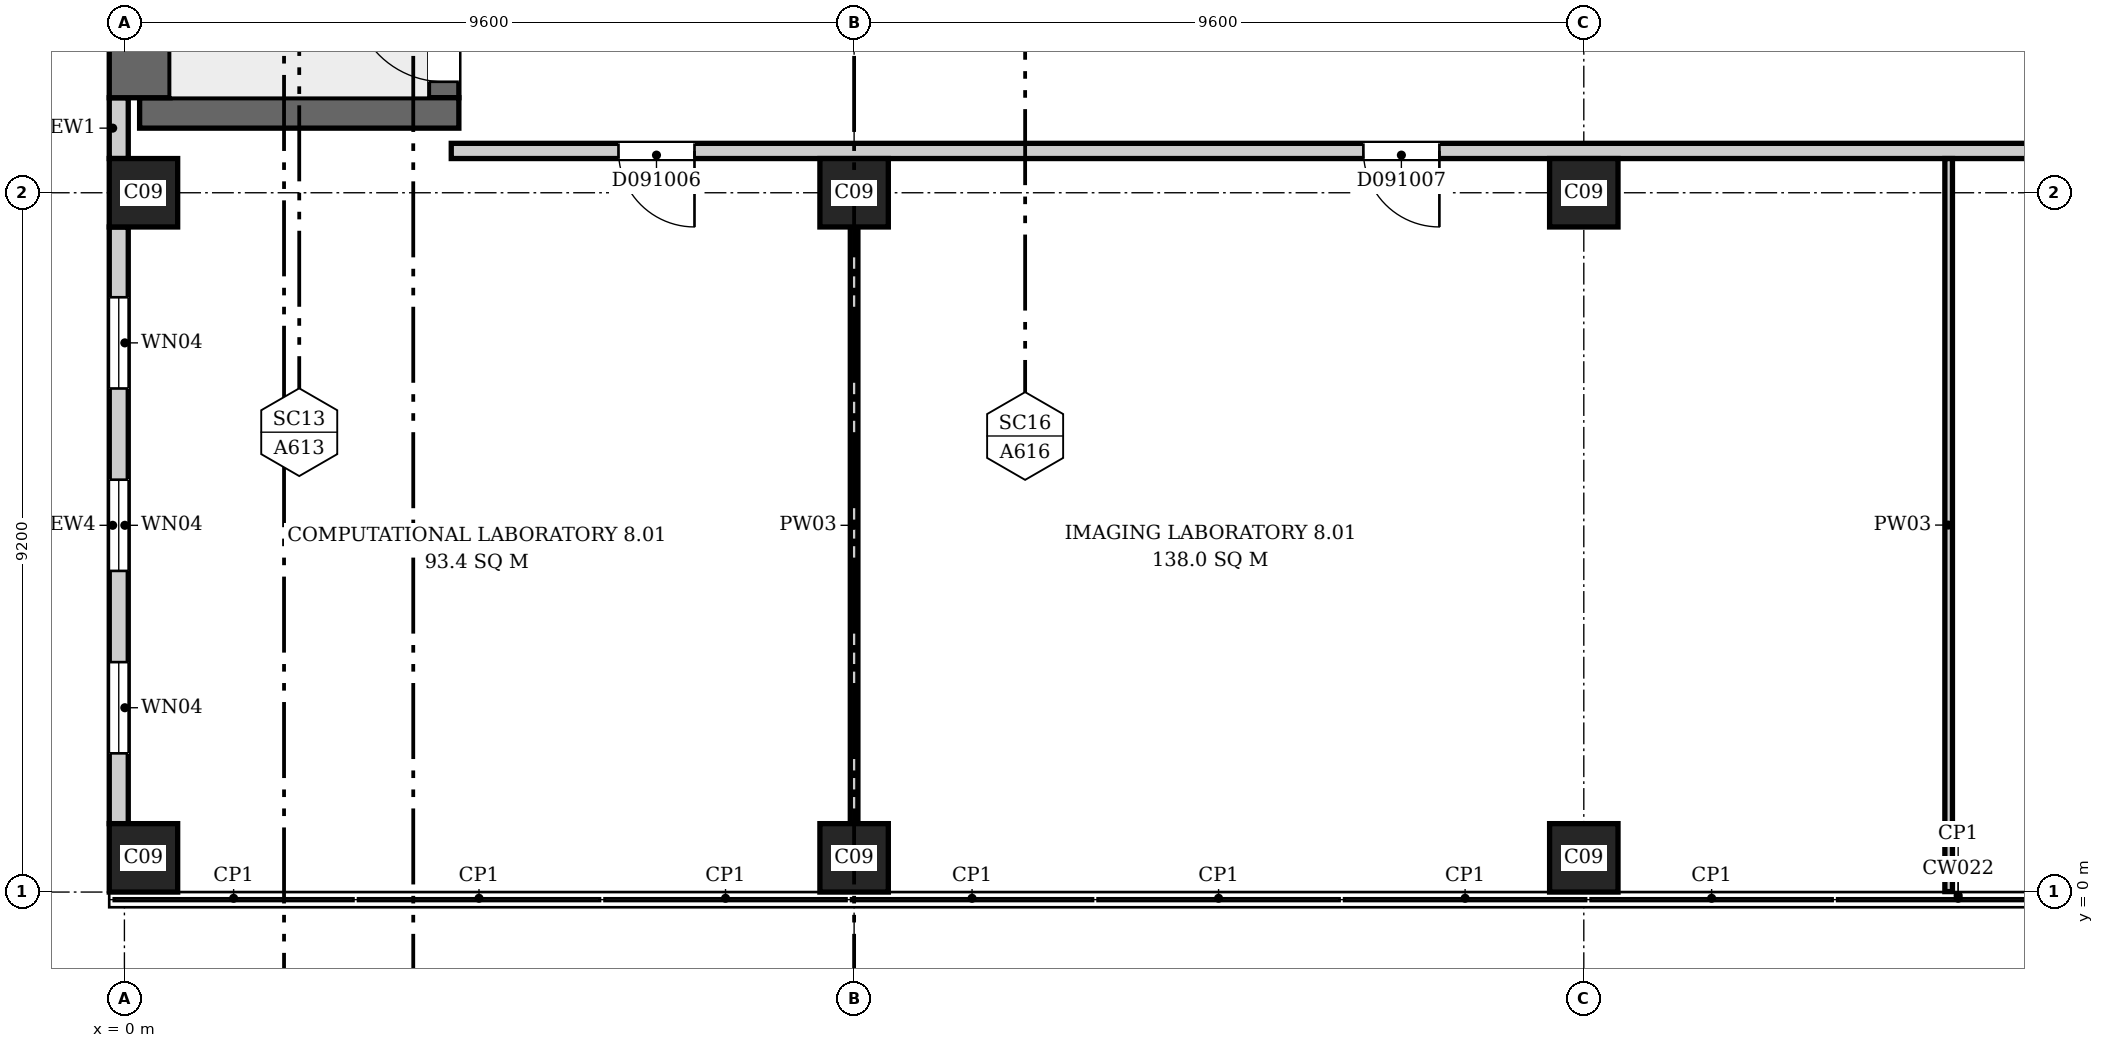
"""IFC4 building model, lengths in metres.
Left out: names, types, materials, properties, quantities, classifications, styles, units other than length and angle.
Written with IfcOpenShell. Run it as: python <this file> out.ifc"""

import sys

from ifc_helpers import new_model, si_unit, direction, frame, frame_2d, origin, origin_2d, place, context, subcontext, project, spatial, rectangle, extrude, element, fill, save


model = new_model("IFC4")
c1 = context("Model", 3, precision=1e-05, world=origin(), true_north=direction((0.0, 1.0)))
c2 = subcontext(c1, "Body", "Model", "MODEL_VIEW")
j1 = project(units=[si_unit("LENGTHUNIT", "METRE"), si_unit("PLANEANGLEUNIT", "RADIAN")], contexts=[c1])
p1 = place(None, origin())
s1 = spatial("IfcSite", under=j1, at=p1, CompositionType="ELEMENT")
p2 = place(p1, origin())
s2 = spatial("IfcBuilding", under=s1, at=p2, CompositionType="ELEMENT")
p3 = place(p2, frame((0.0, 0.0, 44.5)))
s3 = spatial("IfcBuildingStorey", under=s2, at=p3, CompositionType="ELEMENT", Elevation=44.5)
p4 = place(p3, frame((0.2, 10.25, 0.0), z_axis=(0.0, 0.0, 1.0), x_axis=(1.0, 0.0, 0.0)))
e1 = element("IfcWall", 1, at=p4, inside=s3, PredefinedType="SHEAR", context=c2, shape_type="SweptSolid", body=[
    extrude(rectangle(XDim=4.2, YDim=0.4, at=frame_2d((2.1, 0.0))), origin(), (0.0, 0.0, 1.0), 4.2),
])
p5 = place(p3, frame((0.2, 10.45, 0.0), z_axis=(0.0, 0.0, 1.0), x_axis=(0.0, 1.0, 0.0)))
e2 = element("IfcWall", 2, at=p5, inside=s3, PredefinedType="SHEAR", context=c2, shape_type="SweptSolid", body=[
    extrude(rectangle(XDim=6.6, YDim=0.8, at=frame_2d((3.3, 0.0))), origin(), (0.0, 0.0, 1.0), 4.2),
])
p6 = place(p3, frame((4.2, 10.45, 0.0), z_axis=(0.0, 0.0, 1.0), x_axis=(0.0, 1.0, 0.0)))
e3 = element("IfcWall", 3, at=p6, inside=s3, PredefinedType="SHEAR", context=c2, shape_type="SweptSolid", body=[
    extrude(rectangle(XDim=6.6, YDim=0.4, at=frame_2d((3.3, 0.0))), origin(), (0.0, 0.0, 1.0), 4.2),
])
p7 = place(p6, frame((0.21, 0.0, 0.0)))
e4 = element("IfcOpeningElement", 4, at=p7, cuts=e3, PredefinedType="OPENING", context=c2, shape_type="SweptSolid", body=[
    extrude(rectangle(XDim=1.2, YDim=2.1, at=frame_2d((0.6, 1.05))), frame((0.0, 0.21, 0.0), z_axis=(0.0, -1.0, 0.0), x_axis=(1.0, 0.0, 0.0)), (0.0, 0.0, 1.0), 0.42),
])
for number, where, z_axis, x_axis in (
    (5, (0.25, 0.45, 0.0), (0.0, 0.0, 1.0), (1.0, 0.0, 0.0)),
    (6, (9.6, 0.45, 0.0), (0.0, 0.0, 1.0), (1.0, 0.0, 0.0)),
    (7, (19.2, 0.45, 0.0), (0.0, 0.0, 1.0), (1.0, 0.0, 0.0)),
    (8, (0.25, 9.2, 0.0), (0.0, 0.0, 1.0), (1.0, 0.0, 0.0)),
    (9, (9.6, 9.2, 0.0), (0.0, 0.0, 1.0), (1.0, 0.0, 0.0)),
    (10, (19.2, 9.2, 0.0), (0.0, 0.0, 1.0), (1.0, 0.0, 0.0)),
):
    element("IfcColumn", number, at=place(p3, frame(where, z_axis=z_axis, x_axis=x_axis)), inside=s3, PredefinedType="COLUMN", context=c2, shape_type="SweptSolid", body=[
        extrude(rectangle(XDim=0.9, YDim=0.9, at=origin_2d()), origin(), (0.0, 0.0, 1.0), 4.2),
    ])
p8 = place(p3, frame((-0.074, 8.75, 0.0), z_axis=(0.0, 0.0, 1.0), x_axis=(0.0, -1.0, 0.0)))
e11 = element("IfcWall", 11, at=p8, inside=s3, PredefinedType="ELEMENTEDWALL", context=c2, shape_type="SweptSolid", body=[
    extrude(rectangle(XDim=7.85, YDim=0.25, at=frame_2d((3.925, 0.0))), origin(), (0.0, 0.0, 1.0), 3.9),
])
p9 = place(p8, frame((5.725, 0.0, 0.9)))
e12 = element("IfcOpeningElement", 12, at=p9, cuts=e11, PredefinedType="OPENING", context=c2, shape_type="SweptSolid", body=[
    extrude(rectangle(XDim=1.2, YDim=2.6, at=frame_2d((0.6, 1.3))), frame((0.0, 0.135, 0.0), z_axis=(0.0, -1.0, 0.0), x_axis=(1.0, 0.0, 0.0)), (0.0, 0.0, 1.0), 0.27),
])
p10 = place(p8, frame((3.325, 0.0, 0.9)))
e13 = element("IfcOpeningElement", 13, at=p10, cuts=e11, PredefinedType="OPENING", context=c2, shape_type="SweptSolid", body=[
    extrude(rectangle(XDim=1.2, YDim=2.6, at=frame_2d((0.6, 1.3))), frame((0.0, 0.135, 0.0), z_axis=(0.0, -1.0, 0.0), x_axis=(1.0, 0.0, 0.0)), (0.0, 0.0, 1.0), 0.27),
])
p11 = place(p8, frame((0.925, 0.0, 0.9)))
e14 = element("IfcOpeningElement", 14, at=p11, cuts=e11, PredefinedType="OPENING", context=c2, shape_type="SweptSolid", body=[
    extrude(rectangle(XDim=1.2, YDim=2.6, at=frame_2d((0.6, 1.3))), frame((0.0, 0.135, 0.0), z_axis=(0.0, -1.0, 0.0), x_axis=(1.0, 0.0, 0.0)), (0.0, 0.0, 1.0), 0.27),
])
p12 = place(p3, frame((-0.074, 10.45, 0.0), z_axis=(0.0, 0.0, 1.0), x_axis=(0.0, -1.0, 0.0)))
e15 = element("IfcWall", 15, at=p12, inside=s3, PredefinedType="ELEMENTEDWALL", context=c2, shape_type="SweptSolid", body=[
    extrude(rectangle(XDim=0.8, YDim=0.25, at=frame_2d((0.4, 0.0))), origin(), (0.0, 0.0, 1.0), 3.9),
])
p13 = place(p3, frame((4.3, 9.75, 0.0), z_axis=(0.0, 0.0, 1.0), x_axis=(1.0, 0.0, 0.0)))
e16 = element("IfcWall", 16, at=p13, inside=s3, PredefinedType="PARTITIONING", context=c2, shape_type="SweptSolid", body=[
    extrude(rectangle(XDim=43.894, YDim=0.2, at=frame_2d((21.947, 0.0))), origin(), (0.0, 0.0, 1.0), 3.9),
])
p14 = place(p13, frame((2.2, 0.0, 0.0)))
e17 = element("IfcOpeningElement", 17, at=p14, cuts=e16, PredefinedType="OPENING", context=c2, shape_type="SweptSolid", body=[
    extrude(rectangle(XDim=1.0, YDim=2.1, at=frame_2d((0.5, 1.05))), frame((0.0, 0.11, 0.0), z_axis=(0.0, -1.0, 0.0), x_axis=(1.0, 0.0, 0.0)), (0.0, 0.0, 1.0), 0.22),
])
p15 = place(p13, frame((12.0, 0.0, 0.0)))
e18 = element("IfcOpeningElement", 18, at=p15, cuts=e16, PredefinedType="OPENING", context=c2, shape_type="SweptSolid", body=[
    extrude(rectangle(XDim=1.0, YDim=2.1, at=frame_2d((0.5, 1.05))), frame((0.0, 0.11, 0.0), z_axis=(0.0, -1.0, 0.0), x_axis=(1.0, 0.0, 0.0)), (0.0, 0.0, 1.0), 0.22),
])
p16 = place(p13, frame((21.6, 0.0, 0.0)))
e19 = element("IfcOpeningElement", 19, at=p16, cuts=e16, PredefinedType="OPENING", context=c2, shape_type="SweptSolid", body=[
    extrude(rectangle(XDim=1.0, YDim=2.1, at=frame_2d((0.5, 1.05))), frame((0.0, 0.11, 0.0), z_axis=(0.0, -1.0, 0.0), x_axis=(1.0, 0.0, 0.0)), (0.0, 0.0, 1.0), 0.22),
])
p17 = place(p13, frame((28.8, 0.0, 0.0)))
e20 = element("IfcOpeningElement", 20, at=p17, cuts=e16, PredefinedType="OPENING", context=c2, shape_type="SweptSolid", body=[
    extrude(rectangle(XDim=1.0, YDim=2.1, at=frame_2d((0.5, 1.05))), frame((0.0, 0.11, 0.0), z_axis=(0.0, -1.0, 0.0), x_axis=(1.0, 0.0, 0.0)), (0.0, 0.0, 1.0), 0.22),
])
p18 = place(p13, frame((38.25, 0.0, 0.0)))
e21 = element("IfcOpeningElement", 21, at=p18, cuts=e16, PredefinedType="OPENING", context=c2, shape_type="SweptSolid", body=[
    extrude(rectangle(XDim=1.5, YDim=2.1, at=frame_2d((0.75, 1.05))), frame((0.0, 0.11, 0.0), z_axis=(0.0, -1.0, 0.0), x_axis=(1.0, 0.0, 0.0)), (0.0, 0.0, 1.0), 0.22),
])
p19 = place(p3, frame((9.6, 0.9, 0.0), z_axis=(0.0, 0.0, 1.0), x_axis=(0.0, 1.0, 0.0)))
e22 = element("IfcWall", 22, at=p19, inside=s3, PredefinedType="PARTITIONING", context=c2, shape_type="SweptSolid", body=[
    extrude(rectangle(XDim=7.85, YDim=0.1, at=frame_2d((3.925, 0.0))), origin(), (0.0, 0.0, 1.0), 3.9),
])
p20 = place(p3, frame((24.0, 0.006, 0.0), z_axis=(0.0, 0.0, 1.0), x_axis=(0.0, 1.0, 0.0)))
e23 = element("IfcWall", 23, at=p20, inside=s3, PredefinedType="PARTITIONING", context=c2, shape_type="SweptSolid", body=[
    extrude(rectangle(XDim=9.644, YDim=0.1, at=frame_2d((4.822, 0.0))), origin(), (0.0, 0.0, 1.0), 3.9),
])
p21 = place(p9, origin())
e24 = element("IfcWindow", 24, at=p21, inside=s3, PartitioningType="SINGLE_PANEL", PredefinedType="WINDOW", context=c2, shape_type="SweptSolid", body=[
    extrude(rectangle(XDim=1.2, YDim=2.6, at=frame_2d((0.6, 1.3))), frame((0.0, 0.03, 0.0), z_axis=(0.0, -1.0, 0.0), x_axis=(1.0, 0.0, 0.0)), (0.0, 0.0, 1.0), 0.06),
])
fill(e12, e24)
p22 = place(p10, origin())
e25 = element("IfcWindow", 25, at=p22, inside=s3, PartitioningType="SINGLE_PANEL", PredefinedType="WINDOW", context=c2, shape_type="SweptSolid", body=[
    extrude(rectangle(XDim=1.2, YDim=2.6, at=frame_2d((0.6, 1.3))), frame((0.0, 0.03, 0.0), z_axis=(0.0, -1.0, 0.0), x_axis=(1.0, 0.0, 0.0)), (0.0, 0.0, 1.0), 0.06),
])
fill(e13, e25)
p23 = place(p11, origin())
e26 = element("IfcWindow", 26, at=p23, inside=s3, PartitioningType="SINGLE_PANEL", PredefinedType="WINDOW", context=c2, shape_type="SweptSolid", body=[
    extrude(rectangle(XDim=1.2, YDim=2.6, at=frame_2d((0.6, 1.3))), frame((0.0, 0.03, 0.0), z_axis=(0.0, -1.0, 0.0), x_axis=(1.0, 0.0, 0.0)), (0.0, 0.0, 1.0), 0.06),
])
fill(e14, e26)
p24 = place(p7, origin())
e27 = element("IfcDoor", 27, at=p24, inside=s3, OperationType="SINGLE_SWING_RIGHT", PredefinedType="DOOR", context=c2, shape_type="SweptSolid", body=[
    extrude(rectangle(XDim=1.2, YDim=2.1, at=frame_2d((0.6, 1.05))), frame((0.0, 0.025, 0.0), z_axis=(0.0, -1.0, 0.0), x_axis=(1.0, 0.0, 0.0)), (0.0, 0.0, 1.0), 0.05),
])
fill(e4, e27)
p25 = place(p14, origin())
e28 = element("IfcDoor", 28, at=p25, inside=s3, OperationType="SINGLE_SWING_RIGHT", PredefinedType="DOOR", context=c2, shape_type="SweptSolid", body=[
    extrude(rectangle(XDim=1.0, YDim=2.1, at=frame_2d((0.5, 1.05))), frame((0.0, 0.025, 0.0), z_axis=(0.0, -1.0, 0.0), x_axis=(1.0, 0.0, 0.0)), (0.0, 0.0, 1.0), 0.05),
])
fill(e17, e28)
p26 = place(p15, origin())
e29 = element("IfcDoor", 29, at=p26, inside=s3, OperationType="SINGLE_SWING_RIGHT", PredefinedType="DOOR", context=c2, shape_type="SweptSolid", body=[
    extrude(rectangle(XDim=1.0, YDim=2.1, at=frame_2d((0.5, 1.05))), frame((0.0, 0.025, 0.0), z_axis=(0.0, -1.0, 0.0), x_axis=(1.0, 0.0, 0.0)), (0.0, 0.0, 1.0), 0.05),
])
fill(e18, e29)
save(model, sys.argv[1])
